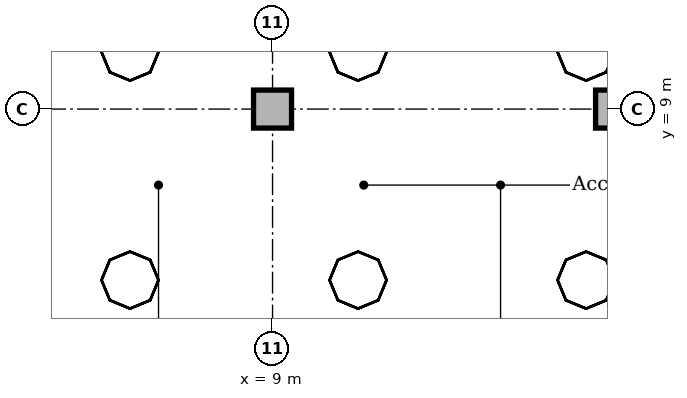
"""IFC4 building model, lengths in metres.
Left out: names, types, materials, properties, quantities, classifications, styles, units other than length and angle.
Written with IfcOpenShell. Run it as: python <this file> out.ifc"""

import sys

from ifc_helpers import new_model, si_unit, direction, frame, origin, origin_2d, place, context, subcontext, project, spatial, rectangle, extrude, element, save


model = new_model("IFC4")
c1 = context("Model", 3, precision=1e-05, world=origin(), true_north=direction((0.0, 1.0)))
c2 = subcontext(c1, "Body", "Model", "MODEL_VIEW")
j1 = project(units=[si_unit("LENGTHUNIT", "METRE"), si_unit("PLANEANGLEUNIT", "RADIAN")], contexts=[c1])
p1 = place(None, origin())
s1 = spatial("IfcSite", under=j1, at=p1, CompositionType="ELEMENT")
p2 = place(p1, origin())
s2 = spatial("IfcBuilding", under=s1, at=p2, CompositionType="ELEMENT")
p3 = place(p2, frame((0.0, 0.0, -14.0)))
s3 = spatial("IfcBuildingStorey", under=s2, at=p3, CompositionType="ELEMENT", Elevation=-14.0)
for number, where, z_axis, x_axis in (
    (1, (9.0, 9.0, 0.0), (0.0, 0.0, 1.0), (1.0, 0.0, 0.0)),
    (2, (18.0, 9.0, 0.0), (0.0, 0.0, 1.0), (1.0, 0.0, 0.0)),
):
    element("IfcColumn", number, at=place(p3, frame(where, z_axis=z_axis, x_axis=x_axis)), inside=s3, PredefinedType="COLUMN", context=c2, shape_type="SweptSolid", body=[
        extrude(rectangle(XDim=1.0, YDim=1.0, at=origin_2d()), origin(), (0.0, 0.0, 1.0), 4.15),
    ])
save(model, sys.argv[1])
